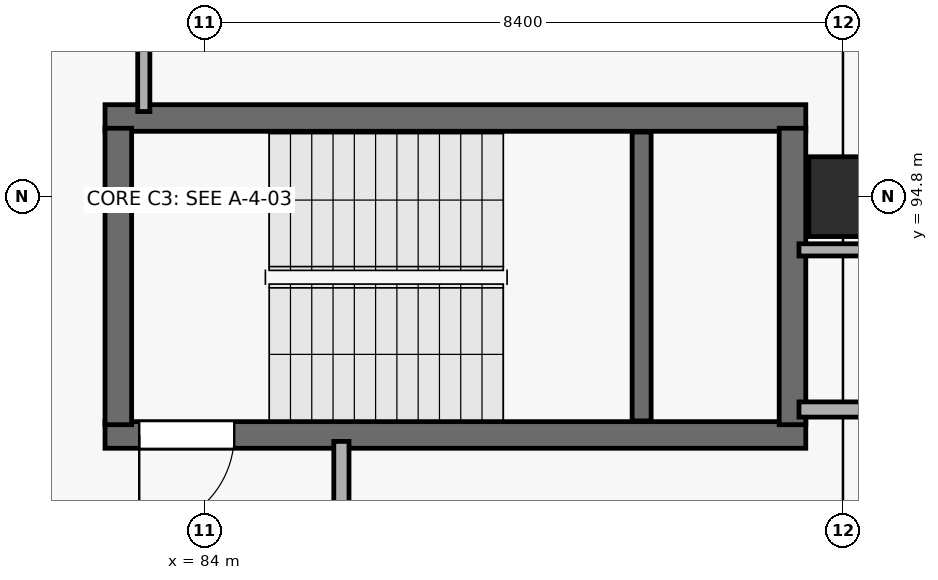
"""IFC4 building model, lengths in metres.
Left out: names, types, materials, properties, quantities, classifications, styles, units other than length and angle.
Written with IfcOpenShell. Run it as: python <this file> out.ifc"""

import sys

from ifc_helpers import new_model, si_unit, direction, frame, frame_2d, origin, origin_2d, place, context, subcontext, project, spatial, rectangle, extrude, element, fill, save


model = new_model("IFC4")
c1 = context("Model", 3, precision=1e-05, world=origin(), true_north=direction((0.0, 1.0)))
c2 = subcontext(c1, "Body", "Model", "MODEL_VIEW")
j1 = project(units=[si_unit("LENGTHUNIT", "METRE"), si_unit("PLANEANGLEUNIT", "RADIAN")], contexts=[c1])
p1 = place(None, origin())
s1 = spatial("IfcSite", under=j1, at=p1, CompositionType="ELEMENT")
p2 = place(p1, origin())
s2 = spatial("IfcBuilding", under=s1, at=p2, CompositionType="ELEMENT")
p3 = place(p2, frame((0.0, 0.0, -4.5)))
s3 = spatial("IfcBuildingStorey", under=s2, at=p3, CompositionType="ELEMENT", Elevation=-4.5)
p4 = place(p3, frame((92.4, 94.8, -0.3), z_axis=(0.0, 0.0, 1.0), x_axis=(1.0, 0.0, 0.0)))
e1 = element("IfcColumn", 1, at=p4, inside=s3, PredefinedType="COLUMN", context=c2, shape_type="SweptSolid", body=[
    extrude(rectangle(XDim=0.9, YDim=1.05, at=origin_2d()), origin(), (0.0, 0.0, 1.0), 4.8),
])
p5 = place(p3, frame((82.69, 91.665, 0.0), z_axis=(0.0, 0.0, 1.0), x_axis=(1.0, 0.0, 0.0)))
e2 = element("IfcWall", 2, at=p5, inside=s3, PredefinedType="SHEAR", context=c2, shape_type="SweptSolid", body=[
    extrude(rectangle(XDim=9.22, YDim=0.35, at=frame_2d((4.61, 0.0))), origin(), (0.0, 0.0, 1.0), 4.22),
])
p6 = place(p5, frame((0.45, 0.0, 0.0)))
e3 = element("IfcOpeningElement", 3, at=p6, cuts=e2, PredefinedType="OPENING", context=c2, shape_type="SweptSolid", body=[
    extrude(rectangle(XDim=1.25, YDim=2.2, at=frame_2d((0.625, 1.1))), frame((0.0, 0.185, 0.0), z_axis=(0.0, -1.0, 0.0), x_axis=(1.0, 0.0, 0.0)), (0.0, 0.0, 1.0), 0.37),
])
p7 = place(p3, frame((91.91, 95.835, 0.0), z_axis=(0.0, 0.0, 1.0), x_axis=(-1.0, 0.0, 0.0)))
e4 = element("IfcWall", 4, at=p7, inside=s3, PredefinedType="SHEAR", context=c2, shape_type="SweptSolid", body=[
    extrude(rectangle(XDim=9.22, YDim=0.35, at=frame_2d((4.61, 0.0))), origin(), (0.0, 0.0, 1.0), 4.22),
])
for number, where, z_axis, x_axis in (
    (5, (82.865, 91.8, 0.0), (0.0, 0.0, 1.0), (0.0, 1.0, 0.0)),
    (6, (91.735, 95.7, 0.0), (0.0, 0.0, 1.0), (0.0, -1.0, 0.0)),
):
    element("IfcWall", number, at=place(p3, frame(where, z_axis=z_axis, x_axis=x_axis)), inside=s3, PredefinedType="SHEAR", context=c2, shape_type="SweptSolid", body=[
        extrude(rectangle(XDim=3.9, YDim=0.35, at=frame_2d((1.95, 0.0))), origin(), (0.0, 0.0, 1.0), 4.22),
    ])
p8 = place(p3, frame((89.75, 91.85, 0.0), z_axis=(0.0, 0.0, 1.0), x_axis=(0.0, 1.0, 0.0)))
e7 = element("IfcWall", 7, at=p8, inside=s3, PredefinedType="SHEAR", context=c2, shape_type="SweptSolid", body=[
    extrude(rectangle(XDim=3.8, YDim=0.25, at=frame_2d((1.9, 0.0))), origin(), (0.0, 0.0, 1.0), 2.07),
])
p9 = place(p3, frame((91.82, 92.0, 0.0), z_axis=(0.0, 0.0, 1.0), x_axis=(1.0, 0.0, 0.0)))
e8 = element("IfcWall", 8, at=p9, inside=s3, PredefinedType="PARTITIONING", context=c2, shape_type="SweptSolid", body=[
    extrude(rectangle(XDim=28.48, YDim=0.2, at=frame_2d((14.24, 0.0))), origin(), (0.0, 0.0, 1.0), 4.22),
])
p10 = place(p9, frame((13.68, 0.0, 0.0)))
e9 = element("IfcOpeningElement", 9, at=p10, cuts=e8, PredefinedType="OPENING", context=c2, shape_type="SweptSolid", body=[
    extrude(rectangle(XDim=1.12, YDim=2.15, at=frame_2d((0.56, 1.075))), frame((0.0, 0.11, 0.0), z_axis=(0.0, -1.0, 0.0), x_axis=(1.0, 0.0, 0.0)), (0.0, 0.0, 1.0), 0.22),
])
p11 = place(p3, frame((111.2, 94.1, 0.0), z_axis=(0.0, 0.0, 1.0), x_axis=(-1.0, 0.0, 0.0)))
e10 = element("IfcWall", 10, at=p11, inside=s3, PredefinedType="PARTITIONING", context=c2, shape_type="SweptSolid", body=[
    extrude(rectangle(XDim=19.38, YDim=0.16, at=frame_2d((9.69, 0.0))), origin(), (0.0, 0.0, 1.0), 4.22),
])
p12 = place(p11, frame((7.387, 0.0, 0.0)))
e11 = element("IfcOpeningElement", 11, at=p12, cuts=e10, PredefinedType="OPENING", context=c2, shape_type="SweptSolid", body=[
    extrude(rectangle(XDim=2.28, YDim=2.75, at=frame_2d((1.14, 1.375))), frame((0.0, 0.09, 0.0), z_axis=(0.0, -1.0, 0.0), x_axis=(1.0, 0.0, 0.0)), (0.0, 0.0, 1.0), 0.18),
])
p13 = place(p3, frame((83.2, 95.92, 0.0), z_axis=(0.0, 0.0, 1.0), x_axis=(0.0, 1.0, 0.0)))
e12 = element("IfcWall", 12, at=p13, inside=s3, PredefinedType="PARTITIONING", context=c2, shape_type="SweptSolid", body=[
    extrude(rectangle(XDim=4.68, YDim=0.16, at=frame_2d((2.34, 0.0))), origin(), (0.0, 0.0, 1.0), 4.22),
])
p14 = place(p3, frame((85.8, 89.38, 0.0), z_axis=(0.0, 0.0, 1.0), x_axis=(0.0, 1.0, 0.0)))
e13 = element("IfcWall", 13, at=p14, inside=s3, PredefinedType="PARTITIONING", context=c2, shape_type="SweptSolid", body=[
    extrude(rectangle(XDim=2.2, YDim=0.2, at=frame_2d((1.1, 0.0))), origin(), (0.0, 0.0, 1.0), 4.22),
])
p15 = place(p6, origin())
e14 = element("IfcDoor", 14, at=p15, inside=s3, OperationType="SINGLE_SWING_RIGHT", PredefinedType="DOOR", context=c2, shape_type="SweptSolid", body=[
    extrude(rectangle(XDim=1.25, YDim=2.2, at=frame_2d((0.625, 1.1))), frame((0.0, 0.025, 0.0), z_axis=(0.0, -1.0, 0.0), x_axis=(1.0, 0.0, 0.0)), (0.0, 0.0, 1.0), 0.05),
])
fill(e3, e14)
save(model, sys.argv[1])
